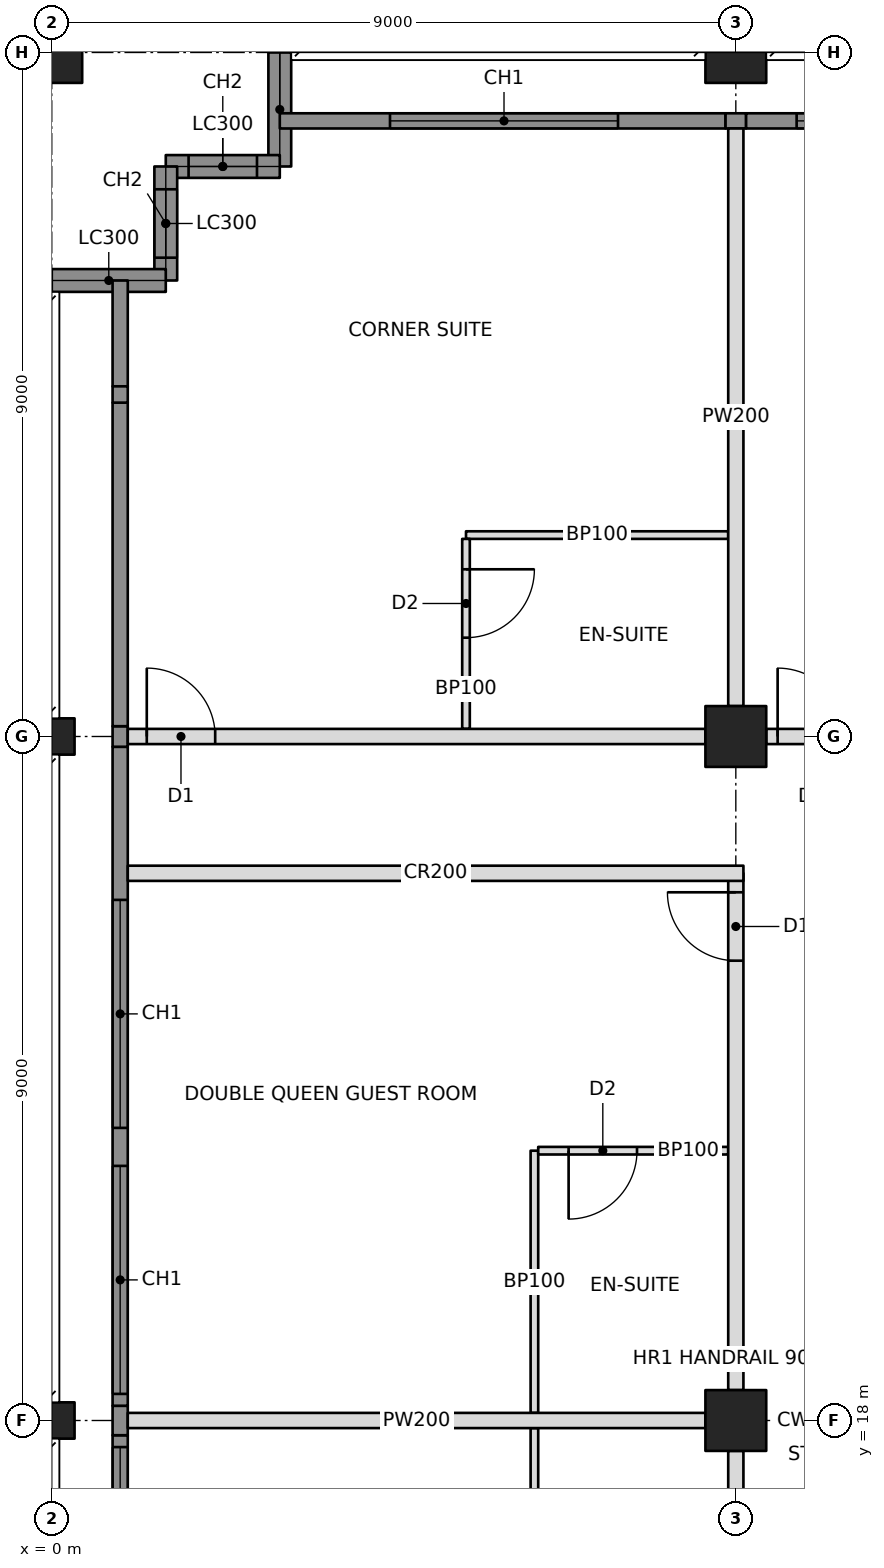
"""IFC4 building model, lengths in metres.
Left out: names, types, materials, properties, quantities, classifications, styles, units other than length and angle.
Written with IfcOpenShell. Run it as: python <this file> out.ifc"""

import sys

from ifc_helpers import new_model, si_unit, direction, frame, frame_2d, origin, origin_2d, place, context, subcontext, project, spatial, rectangle, hollow_rectangle, i_section, extrude, element, fill, save


model = new_model("IFC4")
c1 = context("Model", 3, precision=1e-05, world=origin(), true_north=direction((0.0, 1.0)))
c2 = subcontext(c1, "Body", "Model", "MODEL_VIEW")
j1 = project(units=[si_unit("LENGTHUNIT", "METRE"), si_unit("PLANEANGLEUNIT", "RADIAN")], contexts=[c1])
p1 = place(None, origin())
s1 = spatial("IfcSite", under=j1, at=p1, CompositionType="ELEMENT")
p2 = place(p1, origin())
s2 = spatial("IfcBuilding", under=s1, at=p2, CompositionType="ELEMENT")
p3 = place(p2, frame((0.0, 0.0, 28.0)))
s3 = spatial("IfcBuildingStorey", under=s2, at=p3, CompositionType="ELEMENT", Elevation=28.0)
for number, where, z_axis, x_axis in (
    (1, (0.0, 18.0, 0.0), (0.0, 0.0, 1.0), (0.0, 1.0, 0.0)),
    (2, (0.0, 27.0, 0.0), (0.0, 0.0, 1.0), (0.0, 1.0, 0.0)),
):
    element("IfcColumn", number, at=place(p3, frame(where, z_axis=z_axis, x_axis=x_axis)), inside=s3, PredefinedType="COLUMN", context=c2, shape_type="SweptSolid", body=[
        extrude(i_section(OverallWidth=0.478, OverallDepth=0.599, WebThickness=0.1, FlangeThickness=0.14, at=origin_2d()), origin(), (0.0, 0.0, 1.0), 3.4),
    ])
for number, where, z_axis, x_axis in (
    (3, (0.0, 36.0, 0.0), (0.0, 0.0, 1.0), (1.0, 0.0, 0.0)),
    (4, (9.0, 18.0, 0.0), (0.0, 0.0, 1.0), (1.0, 0.0, 0.0)),
    (5, (9.0, 27.0, 0.0), (0.0, 0.0, 1.0), (1.0, 0.0, 0.0)),
    (6, (9.0, 36.0, 0.0), (0.0, 0.0, 1.0), (1.0, 0.0, 0.0)),
):
    element("IfcColumn", number, at=place(p3, frame(where, z_axis=z_axis, x_axis=x_axis)), inside=s3, PredefinedType="COLUMN", context=c2, shape_type="SweptSolid", body=[
        extrude(hollow_rectangle(XDim=0.8, YDim=0.8, WallThickness=0.1, at=origin_2d()), origin(), (0.0, 0.0, 1.0), 3.4),
    ])
p4 = place(p3, frame((3.0, 36.0, 0.0), z_axis=(0.0, 0.0, 1.0), x_axis=(0.0, -1.0, 0.0)))
e7 = element("IfcWall", 7, at=p4, inside=s3, PredefinedType="SOLIDWALL", context=c2, shape_type="SweptSolid", body=[
    extrude(rectangle(XDim=1.5, YDim=0.3, at=frame_2d((0.75, 0.0))), origin(), (0.0, 0.0, 1.0), 2.42),
])
p5 = place(p3, frame((3.0, 34.5, 0.0), z_axis=(0.0, 0.0, 1.0), x_axis=(-1.0, 0.0, 0.0)))
e8 = element("IfcWall", 8, at=p5, inside=s3, PredefinedType="SOLIDWALL", context=c2, shape_type="SweptSolid", body=[
    extrude(rectangle(XDim=1.5, YDim=0.3, at=frame_2d((0.75, 0.0))), origin(), (0.0, 0.0, 1.0), 3.2),
])
p6 = place(p5, frame((0.3, 0.0, 0.6)))
e9 = element("IfcOpeningElement", 9, at=p6, cuts=e8, PredefinedType="OPENING", context=c2, shape_type="SweptSolid", body=[
    extrude(rectangle(XDim=0.9, YDim=2.2, at=frame_2d((0.45, 1.1))), frame((0.0, 0.16, 0.0), z_axis=(0.0, -1.0, 0.0), x_axis=(1.0, 0.0, 0.0)), (0.0, 0.0, 1.0), 0.32),
])
p7 = place(p3, frame((1.5, 34.5, 0.0), z_axis=(0.0, 0.0, 1.0), x_axis=(0.0, -1.0, 0.0)))
e10 = element("IfcWall", 10, at=p7, inside=s3, PredefinedType="SOLIDWALL", context=c2, shape_type="SweptSolid", body=[
    extrude(rectangle(XDim=1.5, YDim=0.3, at=frame_2d((0.75, 0.0))), origin(), (0.0, 0.0, 1.0), 3.2),
])
p8 = place(p7, frame((0.3, 0.0, 0.6)))
e11 = element("IfcOpeningElement", 11, at=p8, cuts=e10, PredefinedType="OPENING", context=c2, shape_type="SweptSolid", body=[
    extrude(rectangle(XDim=0.9, YDim=2.2, at=frame_2d((0.45, 1.1))), frame((0.0, 0.16, 0.0), z_axis=(0.0, -1.0, 0.0), x_axis=(1.0, 0.0, 0.0)), (0.0, 0.0, 1.0), 0.32),
])
p9 = place(p3, frame((1.5, 33.0, 0.0), z_axis=(0.0, 0.0, 1.0), x_axis=(-1.0, 0.0, 0.0)))
e12 = element("IfcWall", 12, at=p9, inside=s3, PredefinedType="SOLIDWALL", context=c2, shape_type="SweptSolid", body=[
    extrude(rectangle(XDim=1.5, YDim=0.3, at=frame_2d((0.75, 0.0))), origin(), (0.0, 0.0, 1.0), 2.42),
])
p10 = place(p3, frame((3.0, 35.1, 0.0), z_axis=(0.0, 0.0, 1.0), x_axis=(1.0, 0.0, 0.0)))
e13 = element("IfcWall", 13, at=p10, inside=s3, PredefinedType="SOLIDWALL", context=c2, shape_type="SweptSolid", body=[
    extrude(rectangle(XDim=5.865, YDim=0.2, at=frame_2d((2.932, 0.0))), origin(), (0.0, 0.0, 1.0), 3.2),
])
p11 = place(p10, frame((1.45, 0.0, 0.6)))
e14 = element("IfcOpeningElement", 14, at=p11, cuts=e13, PredefinedType="OPENING", context=c2, shape_type="SweptSolid", body=[
    extrude(rectangle(XDim=3.0, YDim=2.2, at=frame_2d((1.5, 1.1))), frame((0.0, 0.11, 0.0), z_axis=(0.0, -1.0, 0.0), x_axis=(1.0, 0.0, 0.0)), (0.0, 0.0, 1.0), 0.22),
])
p12 = place(p3, frame((1.0, 27.0, 0.0), z_axis=(0.0, 0.0, 1.0), x_axis=(1.0, 0.0, 0.0)))
e15 = element("IfcWall", 15, at=p12, inside=s3, PredefinedType="PARTITIONING", context=c2, shape_type="SweptSolid", body=[
    extrude(rectangle(XDim=7.6, YDim=0.2, at=frame_2d((3.8, 0.0))), origin(), (0.0, 0.0, 1.0), 2.438),
])
p13 = place(p12, frame((0.25, 0.0, 0.0)))
e16 = element("IfcOpeningElement", 16, at=p13, cuts=e15, PredefinedType="OPENING", context=c2, shape_type="SweptSolid", body=[
    extrude(rectangle(XDim=0.9, YDim=2.1, at=frame_2d((0.45, 1.05))), frame((0.0, 0.11, 0.0), z_axis=(0.0, -1.0, 0.0), x_axis=(1.0, 0.0, 0.0)), (0.0, 0.0, 1.0), 0.22),
])
p14 = place(p3, frame((9.4, 27.0, 0.0), z_axis=(0.0, 0.0, 1.0), x_axis=(1.0, 0.0, 0.0)))
e17 = element("IfcWall", 17, at=p14, inside=s3, PredefinedType="PARTITIONING", context=c2, shape_type="SweptSolid", body=[
    extrude(rectangle(XDim=8.2, YDim=0.2, at=frame_2d((4.1, 0.0))), origin(), (0.0, 0.0, 1.0), 2.405),
])
p15 = place(p14, frame((0.15, 0.0, 0.0)))
e18 = element("IfcOpeningElement", 18, at=p15, cuts=e17, PredefinedType="OPENING", context=c2, shape_type="SweptSolid", body=[
    extrude(rectangle(XDim=0.9, YDim=2.1, at=frame_2d((0.45, 1.05))), frame((0.0, 0.11, 0.0), z_axis=(0.0, -1.0, 0.0), x_axis=(1.0, 0.0, 0.0)), (0.0, 0.0, 1.0), 0.22),
])
p16 = place(p3, frame((9.0, 10.8, 0.0), z_axis=(0.0, 0.0, 1.0), x_axis=(0.0, 1.0, 0.0)))
e19 = element("IfcWall", 19, at=p16, inside=s3, PredefinedType="PARTITIONING", context=c2, shape_type="SweptSolid", body=[
    extrude(rectangle(XDim=6.8, YDim=0.2, at=frame_2d((3.4, 0.0))), origin(), (0.0, 0.0, 1.0), 2.405),
])
p17 = place(p16, frame((0.25, 0.0, 0.0)))
e20 = element("IfcOpeningElement", 20, at=p17, cuts=e19, PredefinedType="OPENING", context=c2, shape_type="SweptSolid", body=[
    extrude(rectangle(XDim=0.9, YDim=2.1, at=frame_2d((0.45, 1.05))), frame((0.0, 0.11, 0.0), z_axis=(0.0, -1.0, 0.0), x_axis=(1.0, 0.0, 0.0)), (0.0, 0.0, 1.0), 0.22),
])
p18 = place(p3, frame((9.0, 18.4, 0.0), z_axis=(0.0, 0.0, 1.0), x_axis=(0.0, 1.0, 0.0)))
e21 = element("IfcWall", 21, at=p18, inside=s3, PredefinedType="PARTITIONING", context=c2, shape_type="SweptSolid", body=[
    extrude(rectangle(XDim=6.8, YDim=0.2, at=frame_2d((3.4, 0.0))), origin(), (0.0, 0.0, 1.0), 2.405),
])
p19 = place(p18, frame((5.65, 0.0, 0.0)))
e22 = element("IfcOpeningElement", 22, at=p19, cuts=e21, PredefinedType="OPENING", context=c2, shape_type="SweptSolid", body=[
    extrude(rectangle(XDim=0.9, YDim=2.1, at=frame_2d((0.45, 1.05))), frame((0.0, 0.11, 0.0), z_axis=(0.0, -1.0, 0.0), x_axis=(1.0, 0.0, 0.0)), (0.0, 0.0, 1.0), 0.22),
])
p20 = place(p3, frame((1.0, 25.2, 0.0), z_axis=(0.0, 0.0, 1.0), x_axis=(1.0, 0.0, 0.0)))
e23 = element("IfcWall", 23, at=p20, inside=s3, PredefinedType="PARTITIONING", context=c2, shape_type="SweptSolid", body=[
    extrude(rectangle(XDim=8.1, YDim=0.2, at=frame_2d((4.05, 0.0))), origin(), (0.0, 0.0, 1.0), 2.404),
])
p21 = place(p3, frame((9.0, 27.4, 0.0), z_axis=(0.0, 0.0, 1.0), x_axis=(0.0, 1.0, 0.0)))
e24 = element("IfcWall", 24, at=p21, inside=s3, PredefinedType="PARTITIONING", context=c2, shape_type="SweptSolid", body=[
    extrude(rectangle(XDim=7.6, YDim=0.2, at=frame_2d((3.8, 0.0))), origin(), (0.0, 0.0, 1.0), 2.438),
])
p22 = place(p3, frame((5.45, 29.65, 0.0), z_axis=(0.0, 0.0, 1.0), x_axis=(1.0, 0.0, 0.0)))
e25 = element("IfcWall", 25, at=p22, inside=s3, PredefinedType="PARTITIONING", context=c2, shape_type="SweptSolid", body=[
    extrude(rectangle(XDim=3.45, YDim=0.1, at=frame_2d((1.725, 0.0))), origin(), (0.0, 0.0, 1.0), 2.438),
])
p23 = place(p3, frame((5.45, 27.1, 0.0), z_axis=(0.0, 0.0, 1.0), x_axis=(0.0, 1.0, 0.0)))
e26 = element("IfcWall", 26, at=p23, inside=s3, PredefinedType="PARTITIONING", context=c2, shape_type="SweptSolid", body=[
    extrude(rectangle(XDim=2.5, YDim=0.1, at=frame_2d((1.25, 0.0))), origin(), (0.0, 0.0, 1.0), 2.438),
])
p24 = place(p23, frame((1.2, 0.0, 0.0)))
e27 = element("IfcOpeningElement", 27, at=p24, cuts=e26, PredefinedType="OPENING", context=c2, shape_type="SweptSolid", body=[
    extrude(rectangle(XDim=0.9, YDim=2.1, at=frame_2d((0.45, 1.05))), frame((0.0, 0.06, 0.0), z_axis=(0.0, -1.0, 0.0), x_axis=(1.0, 0.0, 0.0)), (0.0, 0.0, 1.0), 0.12),
])
p25 = place(p3, frame((8.6, 18.0, 0.0), z_axis=(0.0, 0.0, 1.0), x_axis=(-1.0, 0.0, 0.0)))
e28 = element("IfcWall", 28, at=p25, inside=s3, PredefinedType="PARTITIONING", context=c2, shape_type="SweptSolid", body=[
    extrude(rectangle(XDim=7.6, YDim=0.2, at=frame_2d((3.8, 0.0))), origin(), (0.0, 0.0, 1.0), 2.405),
])
for number, where, z_axis, x_axis in (
    (29, (6.35, 14.45, 0.0), (0.0, 0.0, 1.0), (0.0, 1.0, 0.0)),
    (30, (6.35, 18.1, 0.0), (0.0, 0.0, 1.0), (0.0, 1.0, 0.0)),
):
    element("IfcWall", number, at=place(p3, frame(where, z_axis=z_axis, x_axis=x_axis)), inside=s3, PredefinedType="PARTITIONING", context=c2, shape_type="SweptSolid", body=[
        extrude(rectangle(XDim=3.45, YDim=0.1, at=frame_2d((1.725, 0.0))), origin(), (0.0, 0.0, 1.0), 2.404),
    ])
p26 = place(p3, frame((8.9, 21.55, 0.0), z_axis=(0.0, 0.0, 1.0), x_axis=(-1.0, 0.0, 0.0)))
e31 = element("IfcWall", 31, at=p26, inside=s3, PredefinedType="PARTITIONING", context=c2, shape_type="SweptSolid", body=[
    extrude(rectangle(XDim=2.5, YDim=0.1, at=frame_2d((1.25, 0.0))), origin(), (0.0, 0.0, 1.0), 2.404),
])
p27 = place(p26, frame((1.2, 0.0, 0.0)))
e32 = element("IfcOpeningElement", 32, at=p27, cuts=e31, PredefinedType="OPENING", context=c2, shape_type="SweptSolid", body=[
    extrude(rectangle(XDim=0.9, YDim=2.1, at=frame_2d((0.45, 1.05))), frame((0.0, 0.06, 0.0), z_axis=(0.0, -1.0, 0.0), x_axis=(1.0, 0.0, 0.0)), (0.0, 0.0, 1.0), 0.12),
])
p28 = place(p3, frame((0.9, 9.135, 0.0), z_axis=(0.0, 0.0, 1.0), x_axis=(0.0, 1.0, 0.0)))
e33 = element("IfcWall", 33, at=p28, inside=s3, PredefinedType="SOLIDWALL", context=c2, shape_type="SweptSolid", body=[
    extrude(rectangle(XDim=8.671, YDim=0.2, at=frame_2d((4.335, 0.0))), origin(), (0.0, 0.0, 1.0), 3.2),
])
p29 = place(p28, frame((2.015, 0.0, 0.6)))
e34 = element("IfcOpeningElement", 34, at=p29, cuts=e33, PredefinedType="OPENING", context=c2, shape_type="SweptSolid", body=[
    extrude(rectangle(XDim=3.0, YDim=2.2, at=frame_2d((1.5, 1.1))), frame((0.0, 0.11, 0.0), z_axis=(0.0, -1.0, 0.0), x_axis=(1.0, 0.0, 0.0)), (0.0, 0.0, 1.0), 0.22),
])
p30 = place(p28, frame((5.515, 0.0, 0.6)))
e35 = element("IfcOpeningElement", 35, at=p30, cuts=e33, PredefinedType="OPENING", context=c2, shape_type="SweptSolid", body=[
    extrude(rectangle(XDim=3.0, YDim=2.2, at=frame_2d((1.5, 1.1))), frame((0.0, 0.11, 0.0), z_axis=(0.0, -1.0, 0.0), x_axis=(1.0, 0.0, 0.0)), (0.0, 0.0, 1.0), 0.22),
])
p31 = place(p3, frame((0.9, 17.806, 0.0), z_axis=(0.0, 0.0, 1.0), x_axis=(0.0, 1.0, 0.0)))
e36 = element("IfcWall", 36, at=p31, inside=s3, PredefinedType="SOLIDWALL", context=c2, shape_type="SweptSolid", body=[
    extrude(rectangle(XDim=0.388, YDim=0.2, at=frame_2d((0.194, 0.0))), origin(), (0.0, 0.0, 1.0), 2.404),
])
p32 = place(p3, frame((0.9, 18.194, 0.0), z_axis=(0.0, 0.0, 1.0), x_axis=(0.0, 1.0, 0.0)))
e37 = element("IfcWall", 37, at=p32, inside=s3, PredefinedType="SOLIDWALL", context=c2, shape_type="SweptSolid", body=[
    extrude(rectangle(XDim=8.671, YDim=0.2, at=frame_2d((4.335, 0.0))), origin(), (0.0, 0.0, 1.0), 3.2),
])
p33 = place(p32, frame((0.156, 0.0, 0.6)))
e38 = element("IfcOpeningElement", 38, at=p33, cuts=e37, PredefinedType="OPENING", context=c2, shape_type="SweptSolid", body=[
    extrude(rectangle(XDim=3.0, YDim=2.2, at=frame_2d((1.5, 1.1))), frame((0.0, 0.11, 0.0), z_axis=(0.0, -1.0, 0.0), x_axis=(1.0, 0.0, 0.0)), (0.0, 0.0, 1.0), 0.22),
])
p34 = place(p32, frame((3.656, 0.0, 0.6)))
e39 = element("IfcOpeningElement", 39, at=p34, cuts=e37, PredefinedType="OPENING", context=c2, shape_type="SweptSolid", body=[
    extrude(rectangle(XDim=3.0, YDim=2.2, at=frame_2d((1.5, 1.1))), frame((0.0, 0.11, 0.0), z_axis=(0.0, -1.0, 0.0), x_axis=(1.0, 0.0, 0.0)), (0.0, 0.0, 1.0), 0.22),
])
p35 = place(p3, frame((0.9, 26.865, 0.0), z_axis=(0.0, 0.0, 1.0), x_axis=(0.0, 1.0, 0.0)))
e40 = element("IfcWall", 40, at=p35, inside=s3, PredefinedType="SOLIDWALL", context=c2, shape_type="SweptSolid", body=[
    extrude(rectangle(XDim=0.271, YDim=0.2, at=frame_2d((0.135, 0.0))), origin(), (0.0, 0.0, 1.0), 2.438),
])
p36 = place(p3, frame((0.9, 27.135, 0.0), z_axis=(0.0, 0.0, 1.0), x_axis=(0.0, 1.0, 0.0)))
e41 = element("IfcWall", 41, at=p36, inside=s3, PredefinedType="SOLIDWALL", context=c2, shape_type="SweptSolid", body=[
    extrude(rectangle(XDim=4.257, YDim=0.2, at=frame_2d((2.129, 0.0))), origin(), (0.0, 0.0, 1.0), 3.2),
])
p37 = place(p3, frame((0.9, 31.393, 0.0), z_axis=(0.0, 0.0, 1.0), x_axis=(0.0, 1.0, 0.0)))
e42 = element("IfcWall", 42, at=p37, inside=s3, PredefinedType="SOLIDWALL", context=c2, shape_type="SweptSolid", body=[
    extrude(rectangle(XDim=0.215, YDim=0.2, at=frame_2d((0.107, 0.0))), origin(), (0.0, 0.0, 1.0), 2.661),
])
p38 = place(p3, frame((0.9, 31.607, 0.0), z_axis=(0.0, 0.0, 1.0), x_axis=(0.0, 1.0, 0.0)))
e43 = element("IfcWall", 43, at=p38, inside=s3, PredefinedType="SOLIDWALL", context=c2, shape_type="SweptSolid", body=[
    extrude(rectangle(XDim=1.393, YDim=0.2, at=frame_2d((0.696, 0.0))), origin(), (0.0, 0.0, 1.0), 3.2),
])
p39 = place(p3, frame((8.865, 35.1, 0.0), z_axis=(0.0, 0.0, 1.0), x_axis=(1.0, 0.0, 0.0)))
e44 = element("IfcWall", 44, at=p39, inside=s3, PredefinedType="SOLIDWALL", context=c2, shape_type="SweptSolid", body=[
    extrude(rectangle(XDim=0.271, YDim=0.2, at=frame_2d((0.135, 0.0))), origin(), (0.0, 0.0, 1.0), 2.438),
])
p40 = place(p3, frame((9.135, 35.1, 0.0), z_axis=(0.0, 0.0, 1.0), x_axis=(1.0, 0.0, 0.0)))
e45 = element("IfcWall", 45, at=p40, inside=s3, PredefinedType="SOLIDWALL", context=c2, shape_type="SweptSolid", body=[
    extrude(rectangle(XDim=8.671, YDim=0.2, at=frame_2d((4.335, 0.0))), origin(), (0.0, 0.0, 1.0), 3.2),
])
p41 = place(p40, frame((0.665, 0.0, 0.6)))
e46 = element("IfcOpeningElement", 46, at=p41, cuts=e45, PredefinedType="OPENING", context=c2, shape_type="SweptSolid", body=[
    extrude(rectangle(XDim=3.0, YDim=2.2, at=frame_2d((1.5, 1.1))), frame((0.0, 0.11, 0.0), z_axis=(0.0, -1.0, 0.0), x_axis=(1.0, 0.0, 0.0)), (0.0, 0.0, 1.0), 0.22),
])
p42 = place(p40, frame((5.065, 0.0, 0.6)))
e47 = element("IfcOpeningElement", 47, at=p42, cuts=e45, PredefinedType="OPENING", context=c2, shape_type="SweptSolid", body=[
    extrude(rectangle(XDim=3.0, YDim=2.2, at=frame_2d((1.5, 1.1))), frame((0.0, 0.11, 0.0), z_axis=(0.0, -1.0, 0.0), x_axis=(1.0, 0.0, 0.0)), (0.0, 0.0, 1.0), 0.22),
])
p43 = place(p6, origin())
e48 = element("IfcWindow", 48, at=p43, inside=s3, PartitioningType="SINGLE_PANEL", PredefinedType="WINDOW", context=c2, shape_type="SweptSolid", body=[
    extrude(rectangle(XDim=0.9, YDim=2.2, at=frame_2d((0.45, 1.1))), frame((0.0, 0.03, 0.0), z_axis=(0.0, -1.0, 0.0), x_axis=(1.0, 0.0, 0.0)), (0.0, 0.0, 1.0), 0.06),
])
fill(e9, e48)
p44 = place(p8, origin())
e49 = element("IfcWindow", 49, at=p44, inside=s3, PartitioningType="SINGLE_PANEL", PredefinedType="WINDOW", context=c2, shape_type="SweptSolid", body=[
    extrude(rectangle(XDim=0.9, YDim=2.2, at=frame_2d((0.45, 1.1))), frame((0.0, 0.03, 0.0), z_axis=(0.0, -1.0, 0.0), x_axis=(1.0, 0.0, 0.0)), (0.0, 0.0, 1.0), 0.06),
])
fill(e11, e49)
p45 = place(p11, origin())
e50 = element("IfcWindow", 50, at=p45, inside=s3, PartitioningType="TRIPLE_PANEL_VERTICAL", PredefinedType="WINDOW", context=c2, shape_type="SweptSolid", body=[
    extrude(rectangle(XDim=3.0, YDim=2.2, at=frame_2d((1.5, 1.1))), frame((0.0, 0.03, 0.0), z_axis=(0.0, -1.0, 0.0), x_axis=(1.0, 0.0, 0.0)), (0.0, 0.0, 1.0), 0.06),
])
fill(e14, e50)
p46 = place(p41, origin())
e51 = element("IfcWindow", 51, at=p46, inside=s3, PartitioningType="TRIPLE_PANEL_VERTICAL", PredefinedType="WINDOW", context=c2, shape_type="SweptSolid", body=[
    extrude(rectangle(XDim=3.0, YDim=2.2, at=frame_2d((1.5, 1.1))), frame((0.0, 0.03, 0.0), z_axis=(0.0, -1.0, 0.0), x_axis=(1.0, 0.0, 0.0)), (0.0, 0.0, 1.0), 0.06),
])
fill(e46, e51)
p47 = place(p30, origin())
e52 = element("IfcWindow", 52, at=p47, inside=s3, PartitioningType="TRIPLE_PANEL_VERTICAL", PredefinedType="WINDOW", context=c2, shape_type="SweptSolid", body=[
    extrude(rectangle(XDim=3.0, YDim=2.2, at=frame_2d((1.5, 1.1))), frame((0.0, 0.03, 0.0), z_axis=(0.0, -1.0, 0.0), x_axis=(1.0, 0.0, 0.0)), (0.0, 0.0, 1.0), 0.06),
])
fill(e35, e52)
p48 = place(p33, origin())
e53 = element("IfcWindow", 53, at=p48, inside=s3, PartitioningType="TRIPLE_PANEL_VERTICAL", PredefinedType="WINDOW", context=c2, shape_type="SweptSolid", body=[
    extrude(rectangle(XDim=3.0, YDim=2.2, at=frame_2d((1.5, 1.1))), frame((0.0, 0.03, 0.0), z_axis=(0.0, -1.0, 0.0), x_axis=(1.0, 0.0, 0.0)), (0.0, 0.0, 1.0), 0.06),
])
fill(e38, e53)
p49 = place(p34, origin())
e54 = element("IfcWindow", 54, at=p49, inside=s3, PartitioningType="TRIPLE_PANEL_VERTICAL", PredefinedType="WINDOW", context=c2, shape_type="SweptSolid", body=[
    extrude(rectangle(XDim=3.0, YDim=2.2, at=frame_2d((1.5, 1.1))), frame((0.0, 0.03, 0.0), z_axis=(0.0, -1.0, 0.0), x_axis=(1.0, 0.0, 0.0)), (0.0, 0.0, 1.0), 0.06),
])
fill(e39, e54)
p50 = place(p24, frame((0.9, 0.0, 0.0), z_axis=(0.0, 0.0, 1.0), x_axis=(-1.0, 0.0, 0.0)))
e55 = element("IfcDoor", 55, at=p50, inside=s3, OperationType="SINGLE_SWING_LEFT", PredefinedType="DOOR", context=c2, shape_type="SweptSolid", body=[
    extrude(rectangle(XDim=0.9, YDim=2.1, at=frame_2d((0.45, 1.05))), frame((0.0, 0.025, 0.0), z_axis=(0.0, -1.0, 0.0), x_axis=(1.0, 0.0, 0.0)), (0.0, 0.0, 1.0), 0.05),
])
fill(e27, e55)
p51 = place(p13, origin())
e56 = element("IfcDoor", 56, at=p51, inside=s3, OperationType="SINGLE_SWING_LEFT", PredefinedType="DOOR", context=c2, shape_type="SweptSolid", body=[
    extrude(rectangle(XDim=0.9, YDim=2.1, at=frame_2d((0.45, 1.05))), frame((0.0, 0.025, 0.0), z_axis=(0.0, -1.0, 0.0), x_axis=(1.0, 0.0, 0.0)), (0.0, 0.0, 1.0), 0.05),
])
fill(e16, e56)
p52 = place(p15, origin())
e57 = element("IfcDoor", 57, at=p52, inside=s3, OperationType="SINGLE_SWING_LEFT", PredefinedType="DOOR", context=c2, shape_type="SweptSolid", body=[
    extrude(rectangle(XDim=0.9, YDim=2.1, at=frame_2d((0.45, 1.05))), frame((0.0, 0.025, 0.0), z_axis=(0.0, -1.0, 0.0), x_axis=(1.0, 0.0, 0.0)), (0.0, 0.0, 1.0), 0.05),
])
fill(e18, e57)
p53 = place(p27, origin())
e58 = element("IfcDoor", 58, at=p53, inside=s3, OperationType="SINGLE_SWING_RIGHT", PredefinedType="DOOR", context=c2, shape_type="SweptSolid", body=[
    extrude(rectangle(XDim=0.9, YDim=2.1, at=frame_2d((0.45, 1.05))), frame((0.0, 0.025, 0.0), z_axis=(0.0, -1.0, 0.0), x_axis=(1.0, 0.0, 0.0)), (0.0, 0.0, 1.0), 0.05),
])
fill(e32, e58)
p54 = place(p19, origin())
e59 = element("IfcDoor", 59, at=p54, inside=s3, OperationType="SINGLE_SWING_RIGHT", PredefinedType="DOOR", context=c2, shape_type="SweptSolid", body=[
    extrude(rectangle(XDim=0.9, YDim=2.1, at=frame_2d((0.45, 1.05))), frame((0.0, 0.025, 0.0), z_axis=(0.0, -1.0, 0.0), x_axis=(1.0, 0.0, 0.0)), (0.0, 0.0, 1.0), 0.05),
])
fill(e22, e59)
save(model, sys.argv[1])
